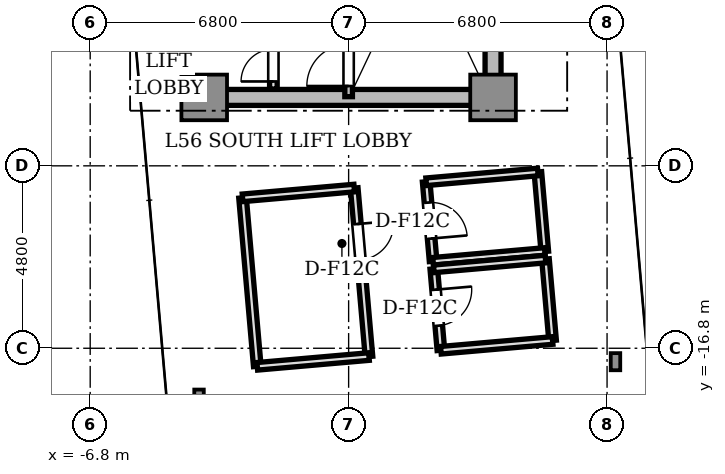
"""IFC4 building model, lengths in metres.
Left out: names, types, materials, properties, quantities, classifications, styles, units other than length and angle.
Written with IfcOpenShell. Run it as: python <this file> out.ifc"""

import sys

from ifc_helpers import new_model, si_unit, direction, frame, frame_2d, origin, origin_2d, place, context, subcontext, project, spatial, rectangle, i_section, extrude, source, transform, mapped, element, fill, save


model = new_model("IFC4")
c1 = context("Model", 3, precision=1e-05, world=origin(), true_north=direction((0.0, 1.0)))
c2 = subcontext(c1, "Body", "Model", "MODEL_VIEW")
j1 = project(units=[si_unit("LENGTHUNIT", "METRE"), si_unit("PLANEANGLEUNIT", "RADIAN")], contexts=[c1])
p1 = place(None, origin())
s1 = spatial("IfcSite", under=j1, at=p1, CompositionType="ELEMENT")
p2 = place(p1, origin())
s2 = spatial("IfcBuilding", under=s1, at=p2, CompositionType="ELEMENT")
p3 = place(p2, frame((0.0, 0.0, 202.0)))
s3 = spatial("IfcBuildingStorey", under=s2, at=p3, CompositionType="ELEMENT", Elevation=202.0)
p4 = place(p3, frame((-3.55, -10.2, 0.0), z_axis=(0.0, 0.0, 1.0), x_axis=(1.0, 0.0, 0.0)))
e1 = element("IfcWall", 1, at=p4, inside=s3, PredefinedType="SHEAR", context=c2, shape_type="SweptSolid", body=[
    extrude(rectangle(XDim=7.1, YDim=0.42, at=frame_2d((3.55, 0.0))), origin(), (0.0, 0.0, 1.0), 4.26),
])
p5 = place(p3, frame((3.8, -9.75, 0.0), z_axis=(0.0, 0.0, 1.0), x_axis=(0.0, 1.0, 0.0)))
e2 = element("IfcWall", 2, at=p5, inside=s3, PredefinedType="SHEAR", context=c2, shape_type="SweptSolid", body=[
    extrude(rectangle(XDim=6.9, YDim=0.42, at=frame_2d((3.45, 0.0))), origin(), (0.0, 0.0, 1.0), 4.26),
])
m1 = source(origin(), c2, "Body", "SweptSolid", [
    extrude(rectangle(XDim=1.2, YDim=1.2, at=origin_2d()), origin(), (0.0, 0.0, 1.0), 4.26),
])
for number, where, z_axis, x_axis in (
    (3, (-3.8, -10.2, 0.0), (0.0, 0.0, 1.0), (1.0, 0.0, 0.0)),
    (4, (3.8, -10.2, 0.0), (0.0, 0.0, 1.0), (1.0, 0.0, 0.0)),
):
    element("IfcColumn", number, at=place(p3, frame(where, z_axis=z_axis, x_axis=x_axis)), inside=s3, PredefinedType="COLUMN", context=c2, shape_type="MappedRepresentation", body=[
        mapped(m1, transform((0.0, 0.0, 0.0), scale=1.0)),
    ])
m2 = source(origin(), c2, "Body", "SweptSolid", [
    extrude(i_section(OverallWidth=0.25, OverallDepth=0.45, WebThickness=0.014, FlangeThickness=0.014, FilletRadius=0.015, at=origin_2d()), origin(), (0.0, 0.0, 1.0), 4.26),
])
for number, where, z_axis, x_axis in (
    (5, (-3.936, -18.112, 0.0), (0.0, 0.0, 1.0), (1.0, 0.0, 0.0)),
    (6, (7.022, -17.153, 0.0), (0.0, 0.0, 1.0), (1.0, 0.0, 0.0)),
):
    element("IfcColumn", number, at=place(p3, frame(where, z_axis=z_axis, x_axis=x_axis)), inside=s3, PredefinedType="COLUMN", context=c2, shape_type="MappedRepresentation", body=[
        mapped(m2, transform((0.0, 0.0, 0.0), scale=1.0)),
    ])
p6 = place(p3, frame((0.0, -10.18, 0.0), z_axis=(0.0, 0.0, 1.0), x_axis=(0.0, 1.0, 0.0)))
e7 = element("IfcWall", 7, at=p6, inside=s3, PredefinedType="SOLIDWALL", context=c2, shape_type="SweptSolid", body=[
    extrude(rectangle(XDim=7.68, YDim=0.2, at=frame_2d((3.84, 0.0))), origin(), (0.0, 0.0, 1.0), 4.26),
])
p7 = place(p6, frame((0.28, 0.0, 0.0)))
e8 = element("IfcOpeningElement", 8, at=p7, cuts=e7, PredefinedType="OPENING", context=c2, shape_type="SweptSolid", body=[
    extrude(rectangle(XDim=1.1, YDim=2.15, at=frame_2d((0.55, 1.075))), frame((0.0, 0.11, 0.0), z_axis=(0.0, -1.0, 0.0), x_axis=(1.0, 0.0, 0.0)), (0.0, 0.0, 1.0), 0.22),
])
p8 = place(p3, frame((-1.98, -9.98, 0.0), z_axis=(0.0, 0.0, 1.0), x_axis=(0.0, 1.0, 0.0)))
e9 = element("IfcWall", 9, at=p8, inside=s3, PredefinedType="SOLIDWALL", context=c2, shape_type="SweptSolid", body=[
    extrude(rectangle(XDim=4.66, YDim=0.2, at=frame_2d((2.33, 0.0))), origin(), (0.0, 0.0, 1.0), 3.81),
])
p9 = place(p8, frame((0.2, 0.0, 0.0)))
e10 = element("IfcOpeningElement", 10, at=p9, cuts=e9, PredefinedType="OPENING", context=c2, shape_type="SweptSolid", body=[
    extrude(rectangle(XDim=0.85, YDim=2.1, at=frame_2d((0.425, 1.05))), frame((0.0, 0.11, 0.0), z_axis=(0.0, -1.0, 0.0), x_axis=(1.0, 0.0, 0.0)), (0.0, 0.0, 1.0), 0.22),
])
p10 = place(p3, frame((2.04, -12.419, 0.0), z_axis=(0.0, 0.0, 1.0), x_axis=(0.08707609357, -0.996201663283, 0.0)))
e11 = element("IfcWall", 11, at=p10, inside=s3, PredefinedType="SOLIDWALL", context=c2, shape_type="SweptSolid", body=[
    extrude(rectangle(XDim=2.1, YDim=0.2, at=frame_2d((1.05, 0.0))), origin(), (0.0, 0.0, 1.0), 3.81),
])
p11 = place(p10, frame((0.55, 0.0, 0.0)))
e12 = element("IfcOpeningElement", 12, at=p11, cuts=e11, PredefinedType="OPENING", context=c2, shape_type="SweptSolid", body=[
    extrude(rectangle(XDim=0.95, YDim=2.15, at=frame_2d((0.475, 1.075))), frame((0.0, 0.11, 0.0), z_axis=(0.0, -1.0, 0.0), x_axis=(1.0, 0.0, 0.0)), (0.0, 0.0, 1.0), 0.22),
])
p12 = place(p3, frame((4.979, -12.162, 0.0), z_axis=(0.0, 0.0, 1.0), x_axis=(0.087191466799, -0.996191571997, 0.0)))
e13 = element("IfcWall", 13, at=p12, inside=s3, PredefinedType="SOLIDWALL", context=c2, shape_type="SweptSolid", body=[
    extrude(rectangle(XDim=2.1, YDim=0.2, at=frame_2d((1.05, 0.0))), origin(), (0.0, 0.0, 1.0), 2.73),
])
p13 = place(p3, frame((2.04, -12.419, 0.0), z_axis=(0.0, 0.0, 1.0), x_axis=(0.996195424117, 0.087147443848, 0.0)))
e14 = element("IfcWall", 14, at=p13, inside=s3, PredefinedType="SOLIDWALL", context=c2, shape_type="SweptSolid", body=[
    extrude(rectangle(XDim=2.95, YDim=0.2, at=frame_2d((1.475, 0.0))), origin(), (0.0, 0.0, 1.0), 3.81),
])
p14 = place(p3, frame((2.223, -14.511, 0.0), z_axis=(0.0, 0.0, 1.0), x_axis=(0.996196052583, 0.087140259459, 0.0)))
e15 = element("IfcWall", 15, at=p14, inside=s3, PredefinedType="SOLIDWALL", context=c2, shape_type="SweptSolid", body=[
    extrude(rectangle(XDim=2.95, YDim=0.2, at=frame_2d((1.475, 0.0))), origin(), (0.0, 0.0, 1.0), 2.73),
])
p15 = place(p3, frame((2.24, -14.711, 0.0), z_axis=(0.0, 0.0, 1.0), x_axis=(0.087207799987, -0.996190142303, 0.0)))
e16 = element("IfcWall", 16, at=p15, inside=s3, PredefinedType="SOLIDWALL", context=c2, shape_type="SweptSolid", body=[
    extrude(rectangle(XDim=2.15, YDim=0.2, at=frame_2d((1.075, 0.0))), origin(), (0.0, 0.0, 1.0), 3.81),
])
p16 = place(p15, frame((0.55, 0.0, 0.0)))
e17 = element("IfcOpeningElement", 17, at=p16, cuts=e16, PredefinedType="OPENING", context=c2, shape_type="SweptSolid", body=[
    extrude(rectangle(XDim=0.95, YDim=2.15, at=frame_2d((0.475, 1.075))), frame((0.0, 0.11, 0.0), z_axis=(0.0, -1.0, 0.0), x_axis=(1.0, 0.0, 0.0)), (0.0, 0.0, 1.0), 0.22),
])
p17 = place(p3, frame((5.179, -14.454, 0.0), z_axis=(0.0, 0.0, 1.0), x_axis=(0.087095110076, -0.996200000904, 0.0)))
e18 = element("IfcWall", 18, at=p17, inside=s3, PredefinedType="SOLIDWALL", context=c2, shape_type="SweptSolid", body=[
    extrude(rectangle(XDim=2.15, YDim=0.2, at=frame_2d((1.075, 0.0))), origin(), (0.0, 0.0, 1.0), 2.73),
])
p18 = place(p3, frame((2.24, -14.711, 0.0), z_axis=(0.0, 0.0, 1.0), x_axis=(0.996196052583, 0.087140259459, 0.0)))
e19 = element("IfcWall", 19, at=p18, inside=s3, PredefinedType="SOLIDWALL", context=c2, shape_type="SweptSolid", body=[
    extrude(rectangle(XDim=2.95, YDim=0.2, at=frame_2d((1.475, 0.0))), origin(), (0.0, 0.0, 1.0), 2.73),
])
p19 = place(p3, frame((2.428, -16.853, 0.0), z_axis=(0.0, 0.0, 1.0), x_axis=(0.996195424117, 0.087147443848, 0.0)))
e20 = element("IfcWall", 20, at=p19, inside=s3, PredefinedType="SOLIDWALL", context=c2, shape_type="SweptSolid", body=[
    extrude(rectangle(XDim=2.95, YDim=0.2, at=frame_2d((1.475, 0.0))), origin(), (0.0, 0.0, 1.0), 2.73),
])
p20 = place(p3, frame((0.147, -12.585, 0.0), z_axis=(0.0, 0.0, 1.0), x_axis=(0.087176478262, -0.996192883752, 0.0)))
e21 = element("IfcWall", 21, at=p20, inside=s3, PredefinedType="SOLIDWALL", context=c2, shape_type="SweptSolid", body=[
    extrude(rectangle(XDim=4.45, YDim=0.2, at=frame_2d((2.225, 0.0))), origin(), (0.0, 0.0, 1.0), 3.81),
])
p21 = place(p20, frame((0.95, 0.0, 0.0)))
e22 = element("IfcOpeningElement", 22, at=p21, cuts=e21, PredefinedType="OPENING", context=c2, shape_type="SweptSolid", body=[
    extrude(rectangle(XDim=0.95, YDim=2.15, at=frame_2d((0.475, 1.075))), frame((0.0, 0.11, 0.0), z_axis=(0.0, -1.0, 0.0), x_axis=(1.0, 0.0, 0.0)), (0.0, 0.0, 1.0), 0.22),
])
p22 = place(p3, frame((-2.792, -12.842, 0.0), z_axis=(0.0, 0.0, 1.0), x_axis=(0.087181243031, -0.996192466777, 0.0)))
e23 = element("IfcWall", 23, at=p22, inside=s3, PredefinedType="SOLIDWALL", context=c2, shape_type="SweptSolid", body=[
    extrude(rectangle(XDim=4.45, YDim=0.2, at=frame_2d((2.225, 0.0))), origin(), (0.0, 0.0, 1.0), 3.81),
])
p23 = place(p3, frame((-2.792, -12.842, 0.0), z_axis=(0.0, 0.0, 1.0), x_axis=(0.996188865451, 0.087222384465, 0.0)))
e24 = element("IfcWall", 24, at=p23, inside=s3, PredefinedType="SOLIDWALL", context=c2, shape_type="SweptSolid", body=[
    extrude(rectangle(XDim=2.95, YDim=0.2, at=frame_2d((1.475, 0.0))), origin(), (0.0, 0.0, 1.0), 3.81),
])
p24 = place(p3, frame((-2.404, -17.275, 0.0), z_axis=(0.0, 0.0, 1.0), x_axis=(0.996196052583, 0.087140259459, 0.0)))
e25 = element("IfcWall", 25, at=p24, inside=s3, PredefinedType="SOLIDWALL", context=c2, shape_type="SweptSolid", body=[
    extrude(rectangle(XDim=2.95, YDim=0.2, at=frame_2d((1.475, 0.0))), origin(), (0.0, 0.0, 1.0), 2.73),
])
m3 = source(origin(), c2, "Body", "SweptSolid", [
    extrude(rectangle(XDim=1.1, YDim=0.05, at=origin_2d()), origin(), (0.0, 0.0, 1.0), 2.15),
])
p25 = place(p7, frame((0.55, 0.0, 0.0)))
e26 = element("IfcDoor", 26, at=p25, inside=s3, OperationType="SINGLE_SWING_LEFT", PredefinedType="DOOR", context=c2, shape_type="MappedRepresentation", body=[
    mapped(m3, transform((0.0, 0.0, 0.0), scale=1.0)),
])
fill(e8, e26)
m4 = source(origin(), c2, "Body", "SweptSolid", [
    extrude(rectangle(XDim=0.85, YDim=0.05, at=origin_2d()), origin(), (0.0, 0.0, 1.0), 2.1),
])
p26 = place(p9, frame((0.425, 0.0, 0.0)))
e27 = element("IfcDoor", 27, at=p26, inside=s3, OperationType="SINGLE_SWING_LEFT", PredefinedType="DOOR", context=c2, shape_type="MappedRepresentation", body=[
    mapped(m4, transform((0.0, 0.0, 0.0), scale=1.0)),
])
fill(e10, e27)
m5 = source(origin(), c2, "Body", "SweptSolid", [
    extrude(rectangle(XDim=0.95, YDim=0.05, at=origin_2d()), origin(), (0.0, 0.0, 1.0), 2.15),
])
p27 = place(p11, frame((0.475, 0.0, 0.0)))
e28 = element("IfcDoor", 28, at=p27, inside=s3, OperationType="SINGLE_SWING_RIGHT", PredefinedType="DOOR", context=c2, shape_type="MappedRepresentation", body=[
    mapped(m5, transform((0.0, 0.0, 0.0), scale=1.0)),
])
fill(e12, e28)
p28 = place(p16, frame((0.475, 0.0, 0.0)))
e29 = element("IfcDoor", 29, at=p28, inside=s3, OperationType="SINGLE_SWING_LEFT", PredefinedType="DOOR", context=c2, shape_type="MappedRepresentation", body=[
    mapped(m5, transform((0.0, 0.0, 0.0), scale=1.0)),
])
fill(e17, e29)
p29 = place(p21, frame((0.475, 0.0, 0.0)))
e30 = element("IfcDoor", 30, at=p29, inside=s3, OperationType="SINGLE_SWING_LEFT", PredefinedType="DOOR", context=c2, shape_type="MappedRepresentation", body=[
    mapped(m5, transform((0.0, 0.0, 0.0), scale=1.0)),
])
fill(e22, e30)
save(model, sys.argv[1])
